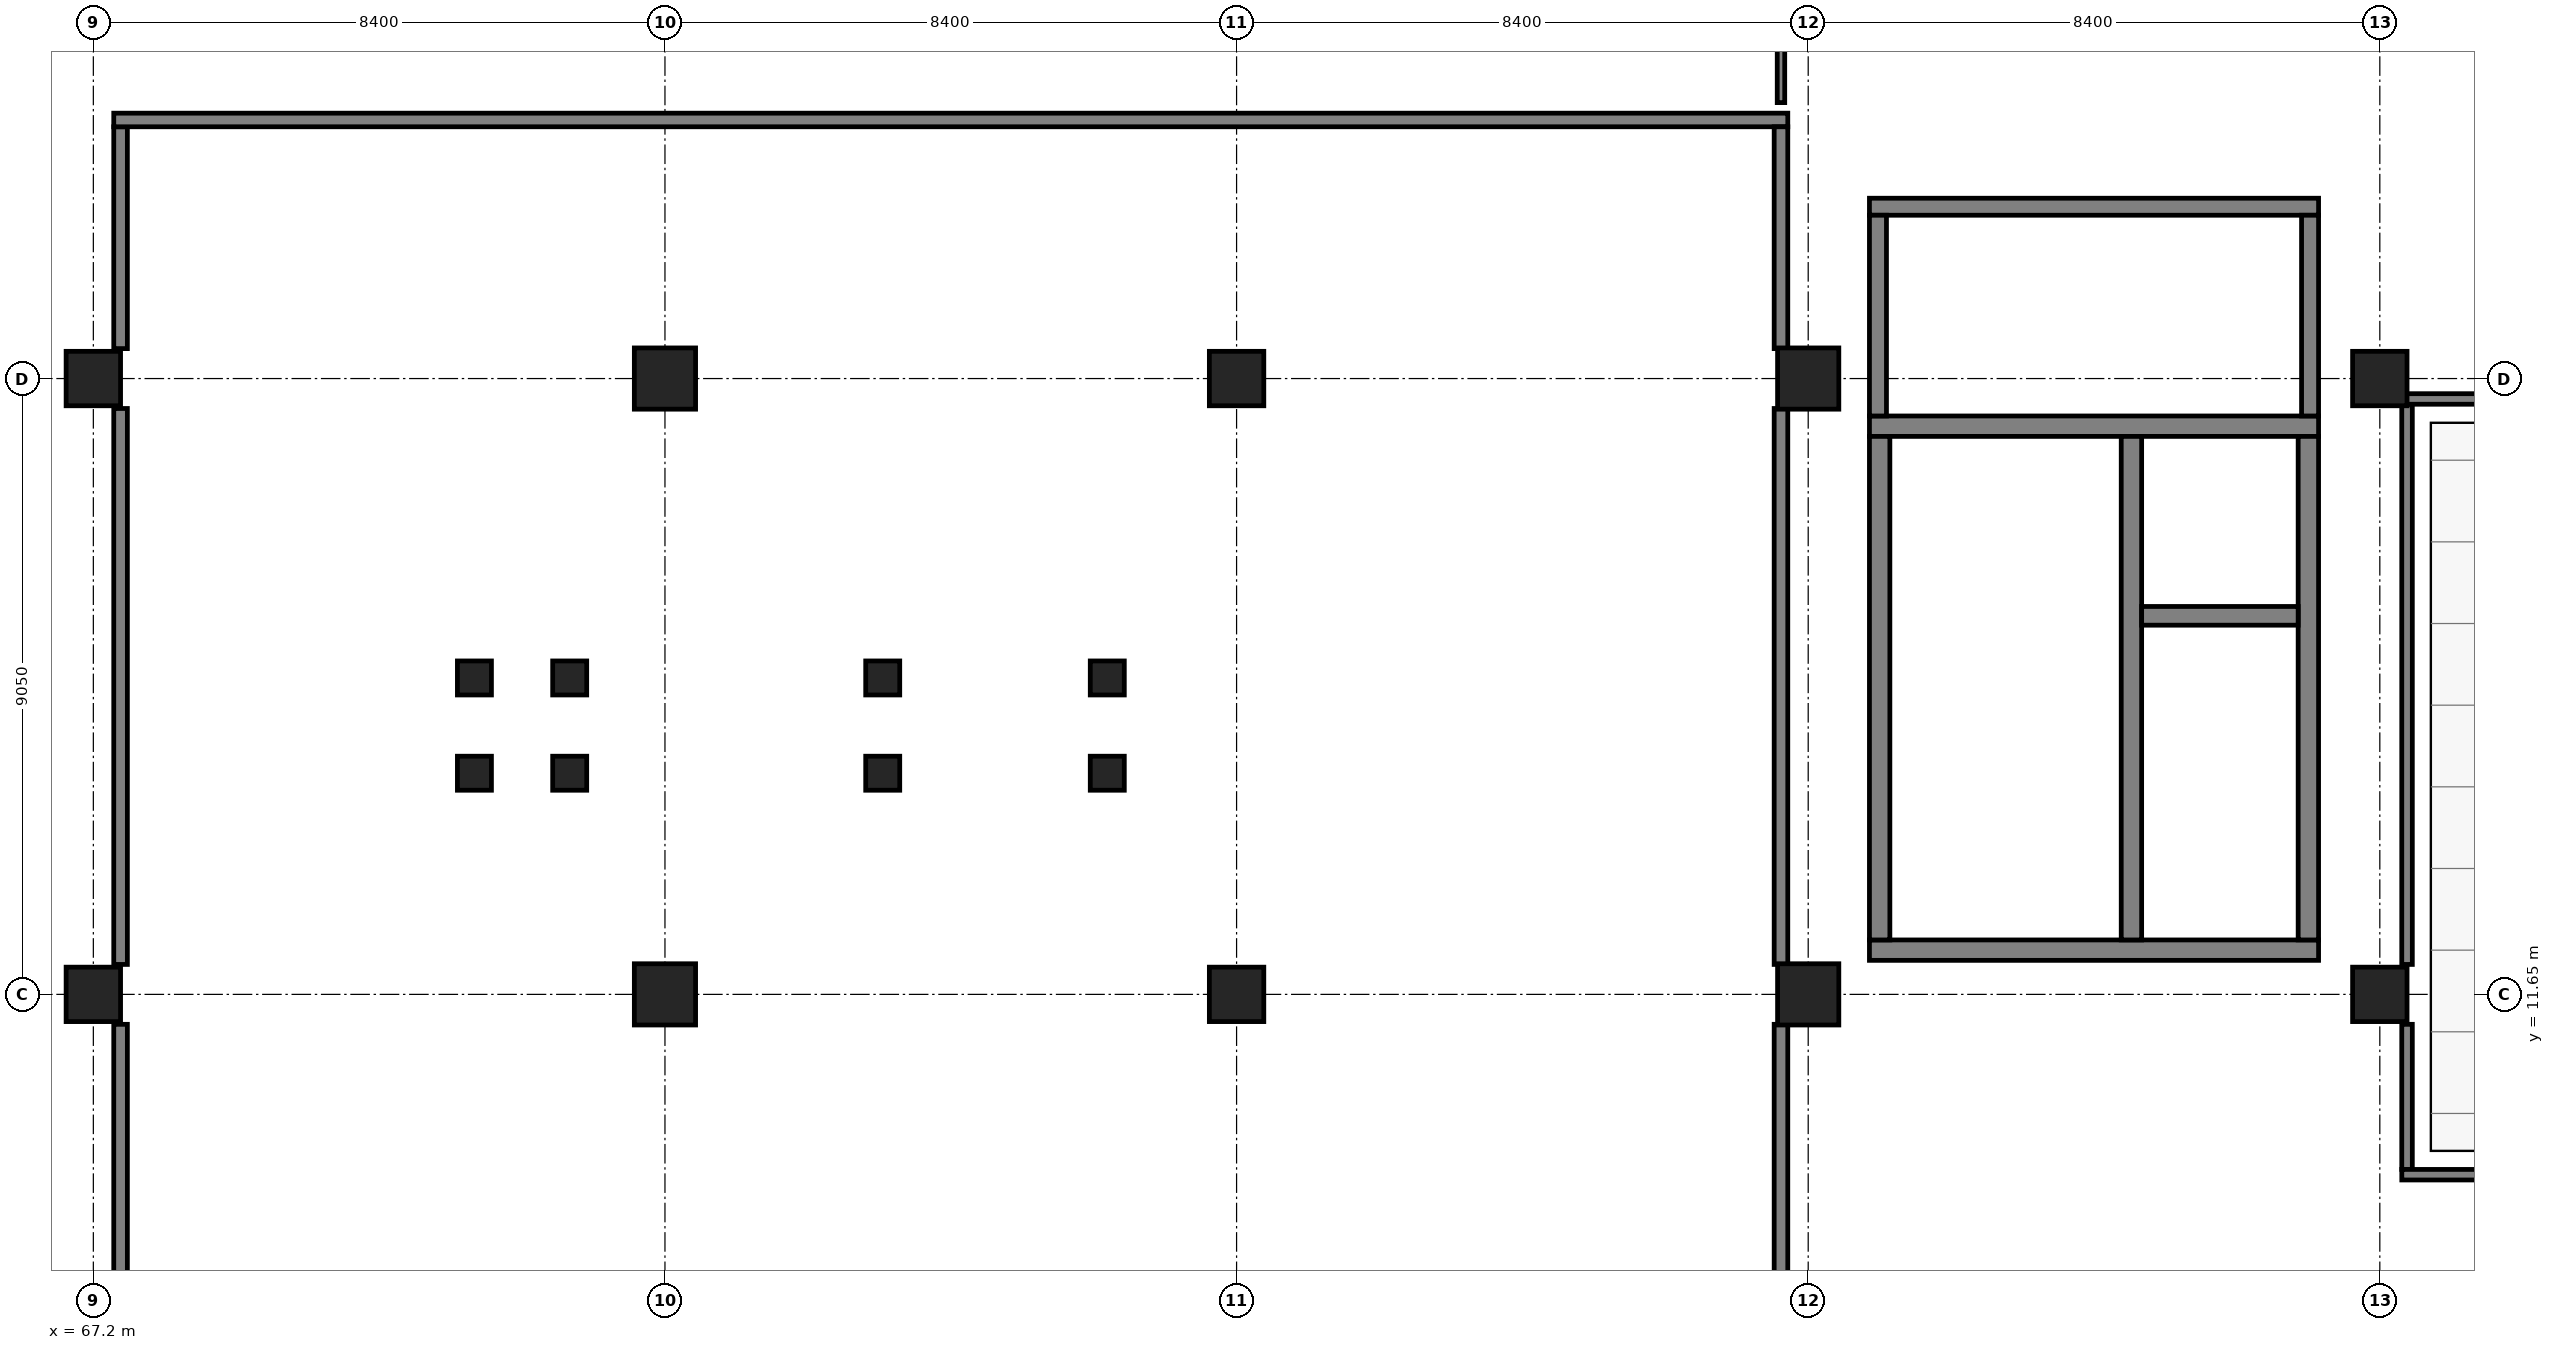
"""IFC4 building model, lengths in metres.
Left out: names, types, materials, properties, quantities, classifications, styles, units other than length and angle.
Written with IfcOpenShell. Run it as: python <this file> out.ifc"""

import sys

from ifc_helpers import new_model, si_unit, direction, frame, frame_2d, origin, origin_2d, place, context, subcontext, project, spatial, rectangle, extrude, element, fill, save


model = new_model("IFC4")
c1 = context("Model", 3, precision=1e-05, world=origin(), true_north=direction((0.0, 1.0)))
c2 = subcontext(c1, "Body", "Model", "MODEL_VIEW")
j1 = project(units=[si_unit("LENGTHUNIT", "METRE"), si_unit("PLANEANGLEUNIT", "RADIAN")], contexts=[c1])
p1 = place(None, origin())
s1 = spatial("IfcSite", under=j1, at=p1, CompositionType="ELEMENT")
p2 = place(p1, origin())
s2 = spatial("IfcBuilding", under=s1, at=p2, CompositionType="ELEMENT")
p3 = place(p2, origin())
s3 = spatial("IfcBuildingStorey", under=s2, at=p3, CompositionType="ELEMENT", Elevation=0.0)
for number, where, z_axis, x_axis in (
    (1, (67.2, 11.65, 0.0), (0.0, 0.0, 1.0), (1.0, 0.0, 0.0)),
    (2, (67.2, 20.7, 0.0), (0.0, 0.0, 1.0), (1.0, 0.0, 0.0)),
):
    element("IfcColumn", number, at=place(p3, frame(where, z_axis=z_axis, x_axis=x_axis)), inside=s3, PredefinedType="COLUMN", context=c2, shape_type="SweptSolid", body=[
        extrude(rectangle(XDim=0.8, YDim=0.8, at=origin_2d()), origin(), (0.0, 0.0, 1.0), 5.4),
    ])
for number, where, z_axis, x_axis in (
    (3, (75.6, 11.65, 0.0), (0.0, 0.0, 1.0), (1.0, 0.0, 0.0)),
    (4, (75.6, 20.7, 0.0), (0.0, 0.0, 1.0), (1.0, 0.0, 0.0)),
):
    element("IfcColumn", number, at=place(p3, frame(where, z_axis=z_axis, x_axis=x_axis)), inside=s3, PredefinedType="COLUMN", context=c2, shape_type="SweptSolid", body=[
        extrude(rectangle(XDim=0.9, YDim=0.9, at=origin_2d()), origin(), (0.0, 0.0, 1.0), 5.4),
    ])
for number, where, z_axis, x_axis in (
    (5, (84.0, 11.65, 0.0), (0.0, 0.0, 1.0), (1.0, 0.0, 0.0)),
    (6, (84.0, 20.7, 0.0), (0.0, 0.0, 1.0), (1.0, 0.0, 0.0)),
):
    element("IfcColumn", number, at=place(p3, frame(where, z_axis=z_axis, x_axis=x_axis)), inside=s3, PredefinedType="COLUMN", context=c2, shape_type="SweptSolid", body=[
        extrude(rectangle(XDim=0.8, YDim=0.8, at=origin_2d()), origin(), (0.0, 0.0, 1.0), 5.4),
    ])
for number, where, z_axis, x_axis in (
    (7, (92.4, 11.65, 0.0), (0.0, 0.0, 1.0), (1.0, 0.0, 0.0)),
    (8, (92.4, 20.7, 0.0), (0.0, 0.0, 1.0), (1.0, 0.0, 0.0)),
):
    element("IfcColumn", number, at=place(p3, frame(where, z_axis=z_axis, x_axis=x_axis)), inside=s3, PredefinedType="COLUMN", context=c2, shape_type="SweptSolid", body=[
        extrude(rectangle(XDim=0.9, YDim=0.9, at=origin_2d()), origin(), (0.0, 0.0, 1.0), 5.4),
    ])
for number, where, z_axis, x_axis in (
    (9, (100.8, 11.65, 0.0), (0.0, 0.0, 1.0), (1.0, 0.0, 0.0)),
    (10, (100.8, 20.7, 0.0), (0.0, 0.0, 1.0), (1.0, 0.0, 0.0)),
):
    element("IfcColumn", number, at=place(p3, frame(where, z_axis=z_axis, x_axis=x_axis)), inside=s3, PredefinedType="COLUMN", context=c2, shape_type="SweptSolid", body=[
        extrude(rectangle(XDim=0.8, YDim=0.8, at=origin_2d()), origin(), (0.0, 0.0, 1.0), 5.4),
    ])
p4 = place(p3, frame((93.3, 12.3, 0.0), z_axis=(0.0, 0.0, 1.0), x_axis=(1.0, 0.0, 0.0)))
e11 = element("IfcWall", 11, at=p4, inside=s3, PredefinedType="SHEAR", context=c2, shape_type="SweptSolid", body=[
    extrude(rectangle(XDim=6.6, YDim=0.3, at=frame_2d((3.3, 0.0))), origin(), (0.0, 0.0, 1.0), 5.09),
])
p5 = place(p3, frame((93.3, 20.0, 0.0), z_axis=(0.0, 0.0, 1.0), x_axis=(1.0, 0.0, 0.0)))
e12 = element("IfcWall", 12, at=p5, inside=s3, PredefinedType="SHEAR", context=c2, shape_type="SweptSolid", body=[
    extrude(rectangle(XDim=6.6, YDim=0.3, at=frame_2d((3.3, 0.0))), origin(), (0.0, 0.0, 1.0), 5.09),
])
p6 = place(p5, frame((1.425, 0.0, 0.0)))
e13 = element("IfcOpeningElement", 13, at=p6, cuts=e12, PredefinedType="OPENING", context=c2, shape_type="SweptSolid", body=[
    extrude(rectangle(XDim=1.15, YDim=2.2, at=frame_2d((0.575, 1.1))), frame((0.0, 0.16, 0.0), z_axis=(0.0, -1.0, 0.0), x_axis=(1.0, 0.0, 0.0)), (0.0, 0.0, 1.0), 0.32),
])
p7 = place(p5, frame((4.55, 0.0, 0.0)))
e14 = element("IfcOpeningElement", 14, at=p7, cuts=e12, PredefinedType="OPENING", context=c2, shape_type="SweptSolid", body=[
    extrude(rectangle(XDim=1.2, YDim=2.15, at=frame_2d((0.6, 1.075))), frame((0.0, 0.16, 0.0), z_axis=(0.0, -1.0, 0.0), x_axis=(1.0, 0.0, 0.0)), (0.0, 0.0, 1.0), 0.32),
])
for number, where, z_axis, x_axis in (
    (15, (93.45, 12.45, 0.0), (0.0, 0.0, 1.0), (0.0, 1.0, 0.0)),
    (16, (99.75, 12.45, 0.0), (0.0, 0.0, 1.0), (0.0, 1.0, 0.0)),
    (17, (97.15, 12.45, 0.0), (0.0, 0.0, 1.0), (0.0, 1.0, 0.0)),
):
    element("IfcWall", number, at=place(p3, frame(where, z_axis=z_axis, x_axis=x_axis)), inside=s3, PredefinedType="SHEAR", context=c2, shape_type="SweptSolid", body=[
        extrude(rectangle(XDim=7.4, YDim=0.3, at=frame_2d((3.7, 0.0))), origin(), (0.0, 0.0, 1.0), 5.09),
    ])
p8 = place(p3, frame((97.3, 17.213, 0.0), z_axis=(0.0, 0.0, 1.0), x_axis=(1.0, 0.0, 0.0)))
e18 = element("IfcWall", 18, at=p8, inside=s3, PredefinedType="SHEAR", context=c2, shape_type="SweptSolid", body=[
    extrude(rectangle(XDim=2.3, YDim=0.275, at=frame_2d((1.15, 0.0))), origin(), (0.0, 0.0, 1.0), 5.09),
])
p9 = place(p3, frame((93.3, 23.225, 0.0), z_axis=(0.0, 0.0, 1.0), x_axis=(1.0, 0.0, 0.0)))
e19 = element("IfcWall", 19, at=p9, inside=s3, PredefinedType="PARTITIONING", context=c2, shape_type="SweptSolid", body=[
    extrude(rectangle(XDim=6.6, YDim=0.25, at=frame_2d((3.3, 0.0))), origin(), (0.0, 0.0, 1.0), 5.09),
])
p10 = place(p9, frame((2.4, 0.0, 0.0)))
e20 = element("IfcOpeningElement", 20, at=p10, cuts=e19, PredefinedType="OPENING", context=c2, shape_type="SweptSolid", body=[
    extrude(rectangle(XDim=1.8, YDim=2.25, at=frame_2d((0.9, 1.125))), frame((0.0, 0.135, 0.0), z_axis=(0.0, -1.0, 0.0), x_axis=(1.0, 0.0, 0.0)), (0.0, 0.0, 1.0), 0.27),
])
for number, where, z_axis, x_axis in (
    (21, (93.425, 20.15, 0.0), (0.0, 0.0, 1.0), (0.0, 1.0, 0.0)),
    (22, (99.775, 20.15, 0.0), (0.0, 0.0, 1.0), (0.0, 1.0, 0.0)),
):
    element("IfcWall", number, at=place(p3, frame(where, z_axis=z_axis, x_axis=x_axis)), inside=s3, PredefinedType="PARTITIONING", context=c2, shape_type="SweptSolid", body=[
        extrude(rectangle(XDim=2.95, YDim=0.25, at=frame_2d((1.475, 0.0))), origin(), (0.0, 0.0, 1.0), 4.23),
    ])
for number, where, z_axis, x_axis in (
    (23, (72.8, 14.9, 0.0), (0.0, 0.0, 1.0), (1.0, 0.0, 0.0)),
    (24, (72.8, 16.3, 0.0), (0.0, 0.0, 1.0), (1.0, 0.0, 0.0)),
    (25, (74.2, 14.9, 0.0), (0.0, 0.0, 1.0), (1.0, 0.0, 0.0)),
    (26, (74.2, 16.3, 0.0), (0.0, 0.0, 1.0), (1.0, 0.0, 0.0)),
):
    element("IfcColumn", number, at=place(p3, frame(where, z_axis=z_axis, x_axis=x_axis)), inside=s3, PredefinedType="COLUMN", context=c2, shape_type="SweptSolid", body=[
        extrude(rectangle(XDim=0.5, YDim=0.5, at=origin_2d()), origin(), (0.0, 0.0, 1.0), 2.4),
    ])
for number, where, z_axis, x_axis in (
    (27, (78.8, 14.9, 0.0), (0.0, 0.0, 1.0), (1.0, 0.0, 0.0)),
    (28, (78.8, 16.3, 0.0), (0.0, 0.0, 1.0), (1.0, 0.0, 0.0)),
    (29, (82.1, 14.9, 0.0), (0.0, 0.0, 1.0), (1.0, 0.0, 0.0)),
    (30, (82.1, 16.3, 0.0), (0.0, 0.0, 1.0), (1.0, 0.0, 0.0)),
):
    element("IfcColumn", number, at=place(p3, frame(where, z_axis=z_axis, x_axis=x_axis)), inside=s3, PredefinedType="COLUMN", context=c2, shape_type="SweptSolid", body=[
        extrude(rectangle(XDim=0.5, YDim=0.5, at=origin_2d()), origin(), (0.0, 0.0, 1.0), 5.1),
    ])
p11 = place(p3, frame((67.6, 2.9, 0.0), z_axis=(0.0, 0.0, 1.0), x_axis=(0.0, 1.0, 0.0)))
e31 = element("IfcWall", 31, at=p11, inside=s3, PredefinedType="PARTITIONING", context=c2, shape_type="SweptSolid", body=[
    extrude(rectangle(XDim=8.31, YDim=0.2, at=frame_2d((4.155, 0.0))), origin(), (0.0, 0.0, 1.0), 3.65),
])
p12 = place(p11, frame((3.265, 0.0, 0.0)))
e32 = element("IfcOpeningElement", 32, at=p12, cuts=e31, PredefinedType="OPENING", context=c2, shape_type="SweptSolid", body=[
    extrude(rectangle(XDim=1.78, YDim=2.38, at=frame_2d((0.89, 1.19))), frame((0.0, 0.11, 0.0), z_axis=(0.0, -1.0, 0.0), x_axis=(1.0, 0.0, 0.0)), (0.0, 0.0, 1.0), 0.22),
])
p13 = place(p3, frame((67.6, 12.09, 0.0), z_axis=(0.0, 0.0, 1.0), x_axis=(0.0, 1.0, 0.0)))
e33 = element("IfcWall", 33, at=p13, inside=s3, PredefinedType="PARTITIONING", context=c2, shape_type="SweptSolid", body=[
    extrude(rectangle(XDim=8.17, YDim=0.2, at=frame_2d((4.085, 0.0))), origin(), (0.0, 0.0, 1.0), 5.09),
])
p14 = place(p3, frame((67.6, 21.14, 0.0), z_axis=(0.0, 0.0, 1.0), x_axis=(0.0, 1.0, 0.0)))
e34 = element("IfcWall", 34, at=p14, inside=s3, PredefinedType="PARTITIONING", context=c2, shape_type="SweptSolid", body=[
    extrude(rectangle(XDim=3.26, YDim=0.2, at=frame_2d((1.63, 0.0))), origin(), (0.0, 0.0, 1.0), 4.54),
])
p15 = place(p3, frame((67.5, 24.5, 0.0), z_axis=(0.0, 0.0, 1.0), x_axis=(1.0, 0.0, 0.0)))
e35 = element("IfcWall", 35, at=p15, inside=s3, PredefinedType="PARTITIONING", context=c2, shape_type="SweptSolid", body=[
    extrude(rectangle(XDim=24.6, YDim=0.2, at=frame_2d((12.3, 0.0))), origin(), (0.0, 0.0, 1.0), 4.13),
])
p16 = place(p15, frame((11.8, 0.0, 0.0)))
e36 = element("IfcOpeningElement", 36, at=p16, cuts=e35, PredefinedType="OPENING", context=c2, shape_type="SweptSolid", body=[
    extrude(rectangle(XDim=1.0, YDim=2.15, at=frame_2d((0.5, 1.075))), frame((0.0, 0.11, 0.0), z_axis=(0.0, -1.0, 0.0), x_axis=(1.0, 0.0, 0.0)), (0.0, 0.0, 1.0), 0.22),
])
p17 = place(p3, frame((92.0, 2.9, 0.0), z_axis=(0.0, 0.0, 1.0), x_axis=(0.0, 1.0, 0.0)))
e37 = element("IfcWall", 37, at=p17, inside=s3, PredefinedType="PARTITIONING", context=c2, shape_type="SweptSolid", body=[
    extrude(rectangle(XDim=8.31, YDim=0.2, at=frame_2d((4.155, 0.0))), origin(), (0.0, 0.0, 1.0), 3.65),
])
p18 = place(p3, frame((92.0, 12.09, 0.0), z_axis=(0.0, 0.0, 1.0), x_axis=(0.0, 1.0, 0.0)))
e38 = element("IfcWall", 38, at=p18, inside=s3, PredefinedType="PARTITIONING", context=c2, shape_type="SweptSolid", body=[
    extrude(rectangle(XDim=8.17, YDim=0.2, at=frame_2d((4.085, 0.0))), origin(), (0.0, 0.0, 1.0), 4.54),
])
p19 = place(p3, frame((92.0, 21.14, 0.0), z_axis=(0.0, 0.0, 1.0), x_axis=(0.0, 1.0, 0.0)))
e39 = element("IfcWall", 39, at=p19, inside=s3, PredefinedType="PARTITIONING", context=c2, shape_type="SweptSolid", body=[
    extrude(rectangle(XDim=3.26, YDim=0.2, at=frame_2d((1.63, 0.0))), origin(), (0.0, 0.0, 1.0), 4.54),
])
p20 = place(p3, frame((92.0, 24.755, 0.0), z_axis=(0.0, 0.0, 1.0), x_axis=(0.0, 1.0, 0.0)))
e40 = element("IfcWall", 40, at=p20, inside=s3, PredefinedType="PARTITIONING", context=c2, shape_type="SweptSolid", body=[
    extrude(rectangle(XDim=4.555, YDim=0.11, at=frame_2d((2.278, 0.0))), origin(), (0.0, 0.0, 1.0), 4.54),
])
p21 = place(p3, frame((101.2, 9.078, 0.0), z_axis=(0.0, 0.0, 1.0), x_axis=(0.0, 1.0, 0.0)))
e41 = element("IfcWall", 41, at=p21, inside=s3, PredefinedType="PARTITIONING", context=c2, shape_type="SweptSolid", body=[
    extrude(rectangle(XDim=2.132, YDim=0.155, at=frame_2d((1.066, 0.0))), origin(), (0.0, 0.0, 1.0), 5.09),
])
p22 = place(p21, frame((0.536, 0.0, 0.0)))
e42 = element("IfcOpeningElement", 42, at=p22, cuts=e41, PredefinedType="OPENING", context=c2, shape_type="SweptSolid", body=[
    extrude(rectangle(XDim=1.06, YDim=2.15, at=frame_2d((0.53, 1.075))), frame((0.0, 0.087, 0.0), z_axis=(0.0, -1.0, 0.0), x_axis=(1.0, 0.0, 0.0)), (0.0, 0.0, 1.0), 0.175),
])
p23 = place(p3, frame((101.2, 12.09, 0.0), z_axis=(0.0, 0.0, 1.0), x_axis=(0.0, 1.0, 0.0)))
e43 = element("IfcWall", 43, at=p23, inside=s3, PredefinedType="PARTITIONING", context=c2, shape_type="SweptSolid", body=[
    extrude(rectangle(XDim=8.232, YDim=0.155, at=frame_2d((4.116, 0.0))), origin(), (0.0, 0.0, 1.0), 4.54),
])
p24 = place(p3, frame((101.123, 20.4, 0.0), z_axis=(0.0, 0.0, 1.0), x_axis=(1.0, 0.0, 0.0)))
e44 = element("IfcWall", 44, at=p24, inside=s3, PredefinedType="PARTITIONING", context=c2, shape_type="SweptSolid", body=[
    extrude(rectangle(XDim=7.754, YDim=0.155, at=frame_2d((3.877, 0.0))), origin(), (0.0, 0.0, 1.0), 4.13),
])
p25 = place(p3, frame((101.123, 9.0, 0.0), z_axis=(0.0, 0.0, 1.0), x_axis=(1.0, 0.0, 0.0)))
e45 = element("IfcWall", 45, at=p25, inside=s3, PredefinedType="PARTITIONING", context=c2, shape_type="SweptSolid", body=[
    extrude(rectangle(XDim=7.754, YDim=0.155, at=frame_2d((3.877, 0.0))), origin(), (0.0, 0.0, 1.0), 4.14),
])
p26 = place(p6, origin())
e46 = element("IfcDoor", 46, at=p26, inside=s3, OperationType="SINGLE_SWING_RIGHT", PredefinedType="DOOR", context=c2, shape_type="SweptSolid", body=[
    extrude(rectangle(XDim=1.15, YDim=2.2, at=frame_2d((0.575, 1.1))), frame((0.0, 0.025, 0.0), z_axis=(0.0, -1.0, 0.0), x_axis=(1.0, 0.0, 0.0)), (0.0, 0.0, 1.0), 0.05),
])
fill(e13, e46)
p27 = place(p7, origin())
e47 = element("IfcDoor", 47, at=p27, inside=s3, OperationType="DOUBLE_DOOR_SLIDING", PredefinedType="DOOR", context=c2, shape_type="SweptSolid", body=[
    extrude(rectangle(XDim=1.2, YDim=2.15, at=frame_2d((0.6, 1.075))), frame((0.0, 0.025, 0.0), z_axis=(0.0, -1.0, 0.0), x_axis=(1.0, 0.0, 0.0)), (0.0, 0.0, 1.0), 0.05),
])
fill(e14, e47)
p28 = place(p10, origin())
e48 = element("IfcDoor", 48, at=p28, inside=s3, OperationType="DOUBLE_DOOR_SINGLE_SWING", PredefinedType="DOOR", context=c2, shape_type="SweptSolid", body=[
    extrude(rectangle(XDim=1.8, YDim=2.25, at=frame_2d((0.9, 1.125))), frame((0.0, 0.025, 0.0), z_axis=(0.0, -1.0, 0.0), x_axis=(1.0, 0.0, 0.0)), (0.0, 0.0, 1.0), 0.05),
])
fill(e20, e48)
p29 = place(p12, frame((1.78, 0.0, 0.0), z_axis=(0.0, 0.0, 1.0), x_axis=(-1.0, 0.0, 0.0)))
e49 = element("IfcDoor", 49, at=p29, inside=s3, OperationType="DOUBLE_DOOR_SINGLE_SWING", PredefinedType="DOOR", context=c2, shape_type="SweptSolid", body=[
    extrude(rectangle(XDim=1.78, YDim=2.38, at=frame_2d((0.89, 1.19))), frame((0.0, 0.025, 0.0), z_axis=(0.0, -1.0, 0.0), x_axis=(1.0, 0.0, 0.0)), (0.0, 0.0, 1.0), 0.05),
])
fill(e32, e49)
p30 = place(p16, origin())
e50 = element("IfcDoor", 50, at=p30, inside=s3, OperationType="SINGLE_SWING_RIGHT", PredefinedType="DOOR", context=c2, shape_type="SweptSolid", body=[
    extrude(rectangle(XDim=1.0, YDim=2.15, at=frame_2d((0.5, 1.075))), frame((0.0, 0.025, 0.0), z_axis=(0.0, -1.0, 0.0), x_axis=(1.0, 0.0, 0.0)), (0.0, 0.0, 1.0), 0.05),
])
fill(e36, e50)
p31 = place(p22, frame((1.06, 0.0, 0.0), z_axis=(0.0, 0.0, 1.0), x_axis=(-1.0, 0.0, 0.0)))
e51 = element("IfcDoor", 51, at=p31, inside=s3, OperationType="SINGLE_SWING_LEFT", PredefinedType="DOOR", context=c2, shape_type="SweptSolid", body=[
    extrude(rectangle(XDim=1.06, YDim=2.15, at=frame_2d((0.53, 1.075))), frame((0.0, 0.025, 0.0), z_axis=(0.0, -1.0, 0.0), x_axis=(1.0, 0.0, 0.0)), (0.0, 0.0, 1.0), 0.05),
])
fill(e42, e51)
save(model, sys.argv[1])
